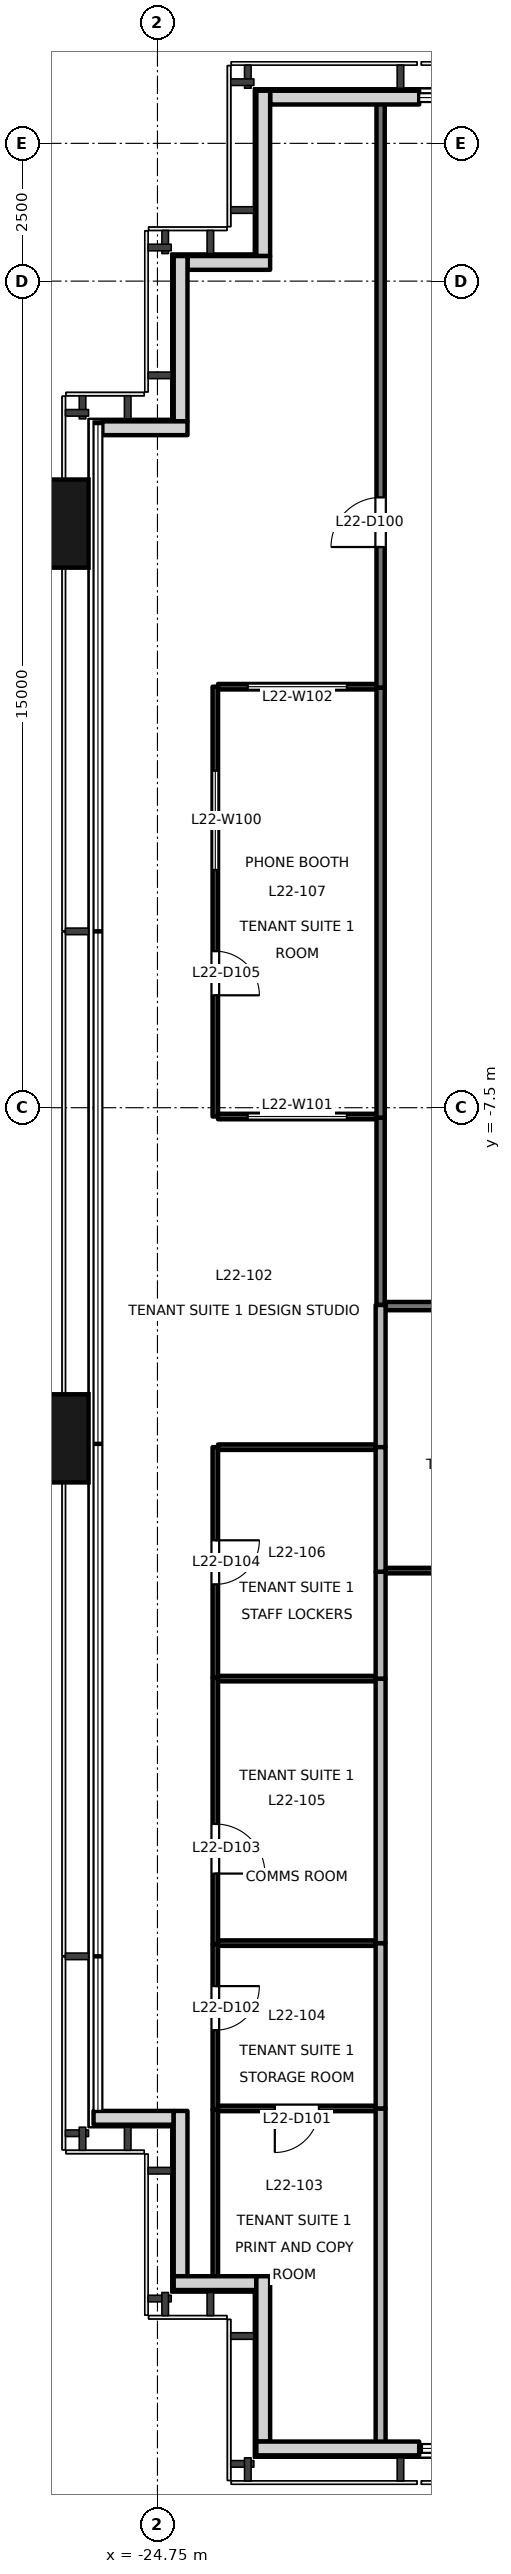
"""IFC4 building model, lengths in metres.
Left out: names, types, materials, properties, quantities, classifications, styles, units other than length and angle.
Written with IfcOpenShell. Run it as: python <this file> out.ifc"""

import sys

from ifc_helpers import new_model, si_unit, direction, frame, frame_2d, origin, origin_2d, place, context, subcontext, project, spatial, rectangle, extrude, element, fill, save


model = new_model("IFC4")
c1 = context("Model", 3, precision=1e-05, world=origin(), true_north=direction((0.0, 1.0)))
c2 = subcontext(c1, "Body", "Model", "MODEL_VIEW")
j1 = project(units=[si_unit("LENGTHUNIT", "METRE"), si_unit("PLANEANGLEUNIT", "RADIAN")], contexts=[c1])
p1 = place(None, origin())
s1 = spatial("IfcSite", under=j1, at=p1, CompositionType="ELEMENT")
p2 = place(p1, origin())
s2 = spatial("IfcBuilding", under=s1, at=p2, CompositionType="ELEMENT")
p3 = place(p2, frame((0.0, 0.0, 99.7)))
s3 = spatial("IfcBuildingStorey", under=s2, at=p3, CompositionType="ELEMENT", Elevation=99.7)
for number, where, z_axis, x_axis in (
    (1, (-26.9, -13.5, -0.2), (0.0, 0.0, 1.0), (0.0, 1.0, 0.0)),
    (2, (-26.9, 3.1, -0.2), (0.0, 0.0, 1.0), (0.0, 1.0, 0.0)),
):
    element("IfcColumn", number, at=place(p3, frame(where, z_axis=z_axis, x_axis=x_axis)), inside=s3, PredefinedType="COLUMN", context=c2, shape_type="SweptSolid", body=[
        extrude(rectangle(XDim=1.6, YDim=1.8, at=origin_2d()), origin(), (0.0, 0.0, 1.0), 4.0),
    ])
p4 = place(p3, frame((-20.0, 10.83, 0.0), z_axis=(0.0, 0.0, 1.0), x_axis=(-1.0, 0.0, 0.0)))
e3 = element("IfcWall", 3, at=p4, inside=s3, PredefinedType="SOLIDWALL", context=c2, shape_type="SweptSolid", body=[
    extrude(rectangle(XDim=2.705, YDim=0.25, at=frame_2d((1.353, 0.0))), origin(), (0.0, 0.0, 1.0), 3.8),
])
p5 = place(p3, frame((-22.83, 10.955, 0.0), z_axis=(0.0, 0.0, 1.0), x_axis=(0.0, -1.0, 0.0)))
e4 = element("IfcWall", 4, at=p5, inside=s3, PredefinedType="SOLIDWALL", context=c2, shape_type="SweptSolid", body=[
    extrude(rectangle(XDim=3.0, YDim=0.25, at=frame_2d((1.5, 0.0))), origin(), (0.0, 0.0, 1.0), 3.8),
])
p6 = place(p3, frame((-22.705, 7.83, 0.0), z_axis=(0.0, 0.0, 1.0), x_axis=(-1.0, 0.0, 0.0)))
e5 = element("IfcWall", 5, at=p6, inside=s3, PredefinedType="SOLIDWALL", context=c2, shape_type="SweptSolid", body=[
    extrude(rectangle(XDim=1.5, YDim=0.25, at=frame_2d((0.75, 0.0))), origin(), (0.0, 0.0, 1.0), 3.8),
])
p7 = place(p3, frame((-24.33, 7.955, 0.0), z_axis=(0.0, 0.0, 1.0), x_axis=(0.0, -1.0, 0.0)))
e6 = element("IfcWall", 6, at=p7, inside=s3, PredefinedType="SOLIDWALL", context=c2, shape_type="SweptSolid", body=[
    extrude(rectangle(XDim=3.0, YDim=0.25, at=frame_2d((1.5, 0.0))), origin(), (0.0, 0.0, 1.0), 3.8),
])
p8 = place(p3, frame((-24.205, 4.83, 0.0), z_axis=(0.0, 0.0, 1.0), x_axis=(-1.0, 0.0, 0.0)))
e7 = element("IfcWall", 7, at=p8, inside=s3, PredefinedType="SOLIDWALL", context=c2, shape_type="SweptSolid", body=[
    extrude(rectangle(XDim=1.545, YDim=0.25, at=frame_2d((0.772, 0.0))), origin(), (0.0, 0.0, 1.0), 3.8),
])
p9 = place(p3, frame((-25.91, -25.83, 0.0), z_axis=(0.0, 0.0, 1.0), x_axis=(1.0, 0.0, 0.0)))
e8 = element("IfcWall", 8, at=p9, inside=s3, PredefinedType="SOLIDWALL", context=c2, shape_type="SweptSolid", body=[
    extrude(rectangle(XDim=1.455, YDim=0.25, at=frame_2d((0.728, 0.0))), origin(), (0.0, 0.0, 1.0), 3.8),
])
p10 = place(p3, frame((-24.33, -25.705, 0.0), z_axis=(0.0, 0.0, 1.0), x_axis=(0.0, -1.0, 0.0)))
e9 = element("IfcWall", 9, at=p10, inside=s3, PredefinedType="SOLIDWALL", context=c2, shape_type="SweptSolid", body=[
    extrude(rectangle(XDim=3.0, YDim=0.25, at=frame_2d((1.5, 0.0))), origin(), (0.0, 0.0, 1.0), 3.8),
])
p11 = place(p3, frame((-24.455, -28.83, 0.0), z_axis=(0.0, 0.0, 1.0), x_axis=(1.0, 0.0, 0.0)))
e10 = element("IfcWall", 10, at=p11, inside=s3, PredefinedType="SOLIDWALL", context=c2, shape_type="SweptSolid", body=[
    extrude(rectangle(XDim=1.5, YDim=0.25, at=frame_2d((0.75, 0.0))), origin(), (0.0, 0.0, 1.0), 3.8),
])
p12 = place(p3, frame((-22.83, -28.705, 0.0), z_axis=(0.0, 0.0, 1.0), x_axis=(0.0, -1.0, 0.0)))
e11 = element("IfcWall", 11, at=p12, inside=s3, PredefinedType="SOLIDWALL", context=c2, shape_type="SweptSolid", body=[
    extrude(rectangle(XDim=3.0, YDim=0.25, at=frame_2d((1.5, 0.0))), origin(), (0.0, 0.0, 1.0), 3.8),
])
p13 = place(p3, frame((-22.955, -31.83, 0.0), z_axis=(0.0, 0.0, 1.0), x_axis=(1.0, 0.0, 0.0)))
e12 = element("IfcWall", 12, at=p13, inside=s3, PredefinedType="SOLIDWALL", context=c2, shape_type="SweptSolid", body=[
    extrude(rectangle(XDim=2.955, YDim=0.25, at=frame_2d((1.478, 0.0))), origin(), (0.0, 0.0, 1.0), 3.8),
])
p14 = place(p3, frame((-20.7, -11.08, 0.0), z_axis=(0.0, 0.0, 1.0), x_axis=(0.0, 1.0, 0.0)))
e13 = element("IfcWall", 13, at=p14, inside=s3, PredefinedType="PARTITIONING", context=c2, shape_type="SweptSolid", body=[
    extrude(rectangle(XDim=3.4, YDim=0.15, at=frame_2d((1.7, 0.0))), origin(), (0.0, 0.0, 1.0), 3.8),
])
p15 = place(p3, frame((-20.7, 0.12, 0.0), z_axis=(0.0, 0.0, 1.0), x_axis=(0.0, 1.0, 0.0)))
e14 = element("IfcWall", 14, at=p15, inside=s3, PredefinedType="PARTITIONING", context=c2, shape_type="SweptSolid", body=[
    extrude(rectangle(XDim=10.62, YDim=0.15, at=frame_2d((5.31, 0.0))), origin(), (0.0, 0.0, 1.0), 3.4),
])
p16 = place(p15, frame((2.555, 0.0, 0.0)))
e15 = element("IfcOpeningElement", 15, at=p16, cuts=e14, PredefinedType="OPENING", context=c2, shape_type="SweptSolid", body=[
    extrude(rectangle(XDim=0.9, YDim=2.1, at=frame_2d((0.45, 1.05))), frame((0.0, 0.085, 0.0), z_axis=(0.0, -1.0, 0.0), x_axis=(1.0, 0.0, 0.0)), (0.0, 0.0, 1.0), 0.171),
])
p17 = place(p3, frame((-20.7, -7.68, 0.0), z_axis=(0.0, 0.0, 1.0), x_axis=(0.0, 1.0, 0.0)))
e16 = element("IfcWall", 16, at=p17, inside=s3, PredefinedType="PARTITIONING", context=c2, shape_type="SweptSolid", body=[
    extrude(rectangle(XDim=7.8, YDim=0.15, at=frame_2d((3.9, 0.0))), origin(), (0.0, 0.0, 1.0), 3.4),
])
p18 = place(p3, frame((-15.056, -11.1, 0.0), z_axis=(0.0, 0.0, 1.0), x_axis=(-1.0, 0.0, 0.0)))
e17 = element("IfcWall", 17, at=p18, inside=s3, PredefinedType="PARTITIONING", context=c2, shape_type="SweptSolid", body=[
    extrude(rectangle(XDim=5.554, YDim=0.15, at=frame_2d((2.777, 0.0))), origin(), (0.0, 0.0, 1.0), 3.8),
])
p19 = place(p3, frame((-23.7, -25.68, 0.0), z_axis=(0.0, 0.0, 1.0), x_axis=(0.0, -1.0, 0.0)))
e18 = element("IfcWall", 18, at=p19, inside=s3, PredefinedType="PARTITIONING", context=c2, shape_type="SweptSolid", body=[
    extrude(rectangle(XDim=3.06, YDim=0.1, at=frame_2d((1.53, 0.0))), origin(), (0.0, 0.0, 1.0), 3.8),
])
p20 = place(p3, frame((-23.7, -22.68, 0.0), z_axis=(0.0, 0.0, 1.0), x_axis=(0.0, -1.0, 0.0)))
e19 = element("IfcWall", 19, at=p20, inside=s3, PredefinedType="PARTITIONING", context=c2, shape_type="SweptSolid", body=[
    extrude(rectangle(XDim=3.0, YDim=0.1, at=frame_2d((1.5, 0.0))), origin(), (0.0, 0.0, 1.0), 3.8),
])
p21 = place(p20, frame((0.76, 0.0, 0.0)))
e20 = element("IfcOpeningElement", 20, at=p21, cuts=e19, PredefinedType="OPENING", context=c2, shape_type="SweptSolid", body=[
    extrude(rectangle(XDim=0.8, YDim=2.1, at=frame_2d((0.4, 1.05))), frame((0.0, 0.061, 0.0), z_axis=(0.0, -1.0, 0.0), x_axis=(1.0, 0.0, 0.0)), (0.0, 0.0, 1.0), 0.121),
])
p22 = place(p3, frame((-23.7, -17.84, 0.0), z_axis=(0.0, 0.0, 1.0), x_axis=(0.0, -1.0, 0.0)))
e21 = element("IfcWall", 21, at=p22, inside=s3, PredefinedType="PARTITIONING", context=c2, shape_type="SweptSolid", body=[
    extrude(rectangle(XDim=4.84, YDim=0.1, at=frame_2d((2.42, 0.0))), origin(), (0.0, 0.0, 1.0), 3.8),
])
p23 = place(p22, frame((2.658, 0.0, 0.0)))
e22 = element("IfcOpeningElement", 22, at=p23, cuts=e21, PredefinedType="OPENING", context=c2, shape_type="SweptSolid", body=[
    extrude(rectangle(XDim=0.9, YDim=2.1, at=frame_2d((0.45, 1.05))), frame((0.0, 0.061, 0.0), z_axis=(0.0, -1.0, 0.0), x_axis=(1.0, 0.0, 0.0)), (0.0, 0.0, 1.0), 0.121),
])
p24 = place(p3, frame((-23.7, -13.66, 0.0), z_axis=(0.0, 0.0, 1.0), x_axis=(0.0, -1.0, 0.0)))
e23 = element("IfcWall", 23, at=p24, inside=s3, PredefinedType="PARTITIONING", context=c2, shape_type="SweptSolid", body=[
    extrude(rectangle(XDim=4.18, YDim=0.1, at=frame_2d((2.09, 0.0))), origin(), (0.0, 0.0, 1.0), 3.8),
])
p25 = place(p24, frame((1.69, 0.0, 0.0)))
e24 = element("IfcOpeningElement", 24, at=p25, cuts=e23, PredefinedType="OPENING", context=c2, shape_type="SweptSolid", body=[
    extrude(rectangle(XDim=0.8, YDim=2.1, at=frame_2d((0.4, 1.05))), frame((0.0, 0.061, 0.0), z_axis=(0.0, -1.0, 0.0), x_axis=(1.0, 0.0, 0.0)), (0.0, 0.0, 1.0), 0.121),
])
p26 = place(p3, frame((-20.79, -13.66, 0.0), z_axis=(0.0, 0.0, 1.0), x_axis=(-1.0, 0.0, 0.0)))
e25 = element("IfcWall", 25, at=p26, inside=s3, PredefinedType="PARTITIONING", context=c2, shape_type="SweptSolid", body=[
    extrude(rectangle(XDim=2.86, YDim=0.1, at=frame_2d((1.43, 0.0))), origin(), (0.0, 0.0, 1.0), 3.8),
])
p27 = place(p3, frame((-23.7, 0.14, 0.0), z_axis=(0.0, 0.0, 1.0), x_axis=(0.0, -1.0, 0.0)))
e26 = element("IfcWall", 26, at=p27, inside=s3, PredefinedType="PARTITIONING", context=c2, shape_type="SweptSolid", body=[
    extrude(rectangle(XDim=7.8, YDim=0.1, at=frame_2d((3.9, 0.0))), origin(), (0.0, 0.0, 1.0), 3.4),
])
p28 = place(p27, frame((4.8, 0.0, 0.0)))
e27 = element("IfcOpeningElement", 27, at=p28, cuts=e26, PredefinedType="OPENING", context=c2, shape_type="SweptSolid", body=[
    extrude(rectangle(XDim=0.8, YDim=2.1, at=frame_2d((0.4, 1.05))), frame((0.0, 0.061, 0.0), z_axis=(0.0, -1.0, 0.0), x_axis=(1.0, 0.0, 0.0)), (0.0, 0.0, 1.0), 0.121),
])
p29 = place(p27, frame((1.525, 0.0, 0.9)))
e28 = element("IfcOpeningElement", 28, at=p29, cuts=e26, PredefinedType="OPENING", context=c2, shape_type="SweptSolid", body=[
    extrude(rectangle(XDim=1.8, YDim=1.2, at=frame_2d((0.9, 0.6))), frame((0.0, 0.061, 0.0), z_axis=(0.0, -1.0, 0.0), x_axis=(1.0, 0.0, 0.0)), (0.0, 0.0, 1.0), 0.121),
])
p30 = place(p3, frame((-23.65, -7.66, 0.0), z_axis=(0.0, 0.0, 1.0), x_axis=(1.0, 0.0, 0.0)))
e29 = element("IfcWall", 29, at=p30, inside=s3, PredefinedType="PARTITIONING", context=c2, shape_type="SweptSolid", body=[
    extrude(rectangle(XDim=2.875, YDim=0.1, at=frame_2d((1.438, 0.0))), origin(), (0.0, 0.0, 1.0), 3.8),
])
p31 = place(p30, frame((0.537, 0.0, 0.9)))
e30 = element("IfcOpeningElement", 30, at=p31, cuts=e29, PredefinedType="OPENING", context=c2, shape_type="SweptSolid", body=[
    extrude(rectangle(XDim=1.8, YDim=1.2, at=frame_2d((0.9, 0.6))), frame((0.0, 0.061, 0.0), z_axis=(0.0, -1.0, 0.0), x_axis=(1.0, 0.0, 0.0)), (0.0, 0.0, 1.0), 0.121),
])
p32 = place(p3, frame((-20.775, 0.14, 0.0), z_axis=(0.0, 0.0, 1.0), x_axis=(-1.0, 0.0, 0.0)))
e31 = element("IfcWall", 31, at=p32, inside=s3, PredefinedType="PARTITIONING", context=c2, shape_type="SweptSolid", body=[
    extrude(rectangle(XDim=2.875, YDim=0.1, at=frame_2d((1.438, 0.0))), origin(), (0.0, 0.0, 1.0), 3.8),
])
p33 = place(p32, frame((0.537, 0.0, 0.9)))
e32 = element("IfcOpeningElement", 32, at=p33, cuts=e31, PredefinedType="OPENING", context=c2, shape_type="SweptSolid", body=[
    extrude(rectangle(XDim=1.8, YDim=1.2, at=frame_2d((0.9, 0.6))), frame((0.0, 0.061, 0.0), z_axis=(0.0, -1.0, 0.0), x_axis=(1.0, 0.0, 0.0)), (0.0, 0.0, 1.0), 0.121),
])
p34 = place(p3, frame((-20.7, -11.08, 0.0), z_axis=(0.0, 0.0, 1.0), x_axis=(0.0, -1.0, 0.0)))
e33 = element("IfcWall", 33, at=p34, inside=s3, PredefinedType="PARTITIONING", context=c2, shape_type="SweptSolid", body=[
    extrude(rectangle(XDim=2.58, YDim=0.18, at=frame_2d((1.29, 0.0))), origin(), (0.0, 0.0, 1.0), 3.8),
])
p35 = place(p3, frame((-20.79, -25.66, 0.0), z_axis=(0.0, 0.0, 1.0), x_axis=(-1.0, 0.0, 0.0)))
e34 = element("IfcWall", 34, at=p35, inside=s3, PredefinedType="PARTITIONING", context=c2, shape_type="SweptSolid", body=[
    extrude(rectangle(XDim=2.86, YDim=0.1, at=frame_2d((1.43, 0.0))), origin(), (0.0, 0.0, 1.0), 3.8),
])
p36 = place(p35, frame((1.03, 0.0, 0.0)))
e35 = element("IfcOpeningElement", 35, at=p36, cuts=e34, PredefinedType="OPENING", context=c2, shape_type="SweptSolid", body=[
    extrude(rectangle(XDim=0.8, YDim=2.1, at=frame_2d((0.4, 1.05))), frame((0.0, 0.061, 0.0), z_axis=(0.0, -1.0, 0.0), x_axis=(1.0, 0.0, 0.0)), (0.0, 0.0, 1.0), 0.121),
])
p37 = place(p3, frame((-20.7, -25.66, 0.0), z_axis=(0.0, 0.0, 1.0), x_axis=(0.0, -1.0, 0.0)))
e36 = element("IfcWall", 36, at=p37, inside=s3, PredefinedType="PARTITIONING", context=c2, shape_type="SweptSolid", body=[
    extrude(rectangle(XDim=6.08, YDim=0.18, at=frame_2d((3.04, 0.0))), origin(), (0.0, 0.0, 1.0), 3.8),
])
p38 = place(p3, frame((-23.65, -22.66, 0.0), z_axis=(0.0, 0.0, 1.0), x_axis=(1.0, 0.0, 0.0)))
e37 = element("IfcWall", 37, at=p38, inside=s3, PredefinedType="PARTITIONING", context=c2, shape_type="SweptSolid", body=[
    extrude(rectangle(XDim=2.86, YDim=0.1, at=frame_2d((1.43, 0.0))), origin(), (0.0, 0.0, 1.0), 3.8),
])
p39 = place(p3, frame((-20.7, -22.66, 0.0), z_axis=(0.0, 0.0, 1.0), x_axis=(0.0, -1.0, 0.0)))
e38 = element("IfcWall", 38, at=p39, inside=s3, PredefinedType="PARTITIONING", context=c2, shape_type="SweptSolid", body=[
    extrude(rectangle(XDim=3.0, YDim=0.18, at=frame_2d((1.5, 0.0))), origin(), (0.0, 0.0, 1.0), 3.8),
])
p40 = place(p3, frame((-23.65, -17.86, 0.0), z_axis=(0.0, 0.0, 1.0), x_axis=(1.0, 0.0, 0.0)))
e39 = element("IfcWall", 39, at=p40, inside=s3, PredefinedType="PARTITIONING", context=c2, shape_type="SweptSolid", body=[
    extrude(rectangle(XDim=2.86, YDim=0.1, at=frame_2d((1.43, 0.0))), origin(), (0.0, 0.0, 1.0), 3.8),
])
p41 = place(p3, frame((-20.7, -17.86, 0.0), z_axis=(0.0, 0.0, 1.0), x_axis=(0.0, -1.0, 0.0)))
e40 = element("IfcWall", 40, at=p41, inside=s3, PredefinedType="PARTITIONING", context=c2, shape_type="SweptSolid", body=[
    extrude(rectangle(XDim=4.8, YDim=0.18, at=frame_2d((2.4, 0.0))), origin(), (0.0, 0.0, 1.0), 3.8),
])
p42 = place(p3, frame((-20.7, -15.92, 0.0), z_axis=(0.0, 0.0, 1.0), x_axis=(0.0, -1.0, 0.0)))
e41 = element("IfcWall", 41, at=p42, inside=s3, PredefinedType="PARTITIONING", context=c2, shape_type="SweptSolid", body=[
    extrude(rectangle(XDim=1.94, YDim=0.18, at=frame_2d((0.97, 0.0))), origin(), (0.0, 0.0, 1.0), 3.8),
])
p43 = place(p3, frame((-20.7, -13.66, 0.0), z_axis=(0.0, 0.0, 1.0), x_axis=(0.0, -1.0, 0.0)))
e42 = element("IfcWall", 42, at=p43, inside=s3, PredefinedType="PARTITIONING", context=c2, shape_type="SweptSolid", body=[
    extrude(rectangle(XDim=2.26, YDim=0.18, at=frame_2d((1.13, 0.0))), origin(), (0.0, 0.0, 1.0), 3.8),
])
p44 = place(p3, frame((-20.61, -15.9, 0.0), z_axis=(0.0, 0.0, 1.0), x_axis=(1.0, 0.0, 0.0)))
e43 = element("IfcWall", 43, at=p44, inside=s3, PredefinedType="PARTITIONING", context=c2, shape_type="SweptSolid", body=[
    extrude(rectangle(XDim=5.534, YDim=0.1, at=frame_2d((2.767, 0.0))), origin(), (0.0, 0.0, 1.0), 3.8),
])
p45 = place(p44, frame((1.49, 0.0, 0.0)))
e44 = element("IfcOpeningElement", 44, at=p45, cuts=e43, PredefinedType="OPENING", context=c2, shape_type="SweptSolid", body=[
    extrude(rectangle(XDim=0.9, YDim=2.1, at=frame_2d((0.45, 1.05))), frame((0.0, 0.061, 0.0), z_axis=(0.0, -1.0, 0.0), x_axis=(1.0, 0.0, 0.0)), (0.0, 0.0, 1.0), 0.121),
])
p46 = place(p16, origin())
e45 = element("IfcDoor", 45, at=p46, inside=s3, OperationType="SINGLE_SWING_LEFT", PredefinedType="DOOR", context=c2, shape_type="SweptSolid", body=[
    extrude(rectangle(XDim=0.9, YDim=2.1, at=frame_2d((0.45, 1.05))), frame((0.0, 0.025, 0.0), z_axis=(0.0, -1.0, 0.0), x_axis=(1.0, 0.0, 0.0)), (0.0, 0.0, 1.0), 0.05),
])
fill(e15, e45)
p47 = place(p36, origin())
e46 = element("IfcDoor", 46, at=p47, inside=s3, OperationType="SINGLE_SWING_RIGHT", PredefinedType="DOOR", context=c2, shape_type="SweptSolid", body=[
    extrude(rectangle(XDim=0.8, YDim=2.1, at=frame_2d((0.4, 1.05))), frame((0.0, 0.025, 0.0), z_axis=(0.0, -1.0, 0.0), x_axis=(1.0, 0.0, 0.0)), (0.0, 0.0, 1.0), 0.05),
])
fill(e35, e46)
p48 = place(p21, origin())
e47 = element("IfcDoor", 47, at=p48, inside=s3, OperationType="SINGLE_SWING_LEFT", PredefinedType="DOOR", context=c2, shape_type="SweptSolid", body=[
    extrude(rectangle(XDim=0.8, YDim=2.1, at=frame_2d((0.4, 1.05))), frame((0.0, 0.025, 0.0), z_axis=(0.0, -1.0, 0.0), x_axis=(1.0, 0.0, 0.0)), (0.0, 0.0, 1.0), 0.05),
])
fill(e20, e47)
p49 = place(p23, origin())
e48 = element("IfcDoor", 48, at=p49, inside=s3, OperationType="SINGLE_SWING_RIGHT", PredefinedType="DOOR", context=c2, shape_type="SweptSolid", body=[
    extrude(rectangle(XDim=0.9, YDim=2.1, at=frame_2d((0.45, 1.05))), frame((0.0, 0.025, 0.0), z_axis=(0.0, -1.0, 0.0), x_axis=(1.0, 0.0, 0.0)), (0.0, 0.0, 1.0), 0.05),
])
fill(e22, e48)
p50 = place(p25, origin())
e49 = element("IfcDoor", 49, at=p50, inside=s3, OperationType="SINGLE_SWING_LEFT", PredefinedType="DOOR", context=c2, shape_type="SweptSolid", body=[
    extrude(rectangle(XDim=0.8, YDim=2.1, at=frame_2d((0.4, 1.05))), frame((0.0, 0.025, 0.0), z_axis=(0.0, -1.0, 0.0), x_axis=(1.0, 0.0, 0.0)), (0.0, 0.0, 1.0), 0.05),
])
fill(e24, e49)
p51 = place(p28, origin())
e50 = element("IfcDoor", 50, at=p51, inside=s3, OperationType="SINGLE_SWING_RIGHT", PredefinedType="DOOR", context=c2, shape_type="SweptSolid", body=[
    extrude(rectangle(XDim=0.8, YDim=2.1, at=frame_2d((0.4, 1.05))), frame((0.0, 0.025, 0.0), z_axis=(0.0, -1.0, 0.0), x_axis=(1.0, 0.0, 0.0)), (0.0, 0.0, 1.0), 0.05),
])
fill(e27, e50)
p52 = place(p29, origin())
e51 = element("IfcWindow", 51, at=p52, inside=s3, PartitioningType="SINGLE_PANEL", PredefinedType="WINDOW", context=c2, shape_type="SweptSolid", body=[
    extrude(rectangle(XDim=1.8, YDim=1.2, at=frame_2d((0.9, 0.6))), frame((0.0, 0.03, 0.0), z_axis=(0.0, -1.0, 0.0), x_axis=(1.0, 0.0, 0.0)), (0.0, 0.0, 1.0), 0.06),
])
fill(e28, e51)
p53 = place(p31, origin())
e52 = element("IfcWindow", 52, at=p53, inside=s3, PartitioningType="SINGLE_PANEL", PredefinedType="WINDOW", context=c2, shape_type="SweptSolid", body=[
    extrude(rectangle(XDim=1.8, YDim=1.2, at=frame_2d((0.9, 0.6))), frame((0.0, 0.03, 0.0), z_axis=(0.0, -1.0, 0.0), x_axis=(1.0, 0.0, 0.0)), (0.0, 0.0, 1.0), 0.06),
])
fill(e30, e52)
p54 = place(p33, origin())
e53 = element("IfcWindow", 53, at=p54, inside=s3, PartitioningType="SINGLE_PANEL", PredefinedType="WINDOW", context=c2, shape_type="SweptSolid", body=[
    extrude(rectangle(XDim=1.8, YDim=1.2, at=frame_2d((0.9, 0.6))), frame((0.0, 0.03, 0.0), z_axis=(0.0, -1.0, 0.0), x_axis=(1.0, 0.0, 0.0)), (0.0, 0.0, 1.0), 0.06),
])
fill(e32, e53)
save(model, sys.argv[1])
